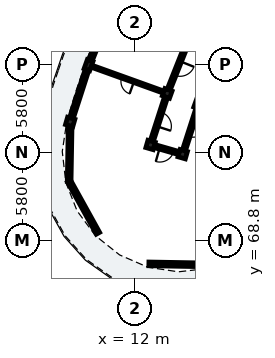
"""IFC4 building model, lengths in metres.
Left out: names, types, materials, properties, quantities, classifications, styles, units other than length and angle.
Written with IfcOpenShell. Run it as: python <this file> out.ifc"""

import sys

from ifc_helpers import new_model, si_unit, direction, frame, frame_2d, origin, origin_2d, place, context, subcontext, project, spatial, rectangle, extrude, element, fill, save


model = new_model("IFC4")
c1 = context("Model", 3, precision=1e-05, world=origin(), true_north=direction((0.0, 1.0)))
c2 = subcontext(c1, "Body", "Model", "MODEL_VIEW")
j1 = project(units=[si_unit("LENGTHUNIT", "METRE"), si_unit("PLANEANGLEUNIT", "RADIAN")], contexts=[c1])
p1 = place(None, origin())
s1 = spatial("IfcSite", under=j1, at=p1, CompositionType="ELEMENT")
p2 = place(p1, origin())
s2 = spatial("IfcBuilding", under=s1, at=p2, CompositionType="ELEMENT")
p3 = place(p2, frame((0.0, 0.0, 29.0)))
s3 = spatial("IfcBuildingStorey", under=s2, at=p3, CompositionType="ELEMENT", Elevation=29.0)
for number, where, z_axis, x_axis in (
    (1, (16.208, 77.745, 0.0), (0.0, 0.0, 1.0), (-0.941, 0.338, 0.0)),
    (2, (14.138, 78.489, 0.0), (0.0, 0.0, 1.0), (-0.941, 0.338, 0.0)),
):
    element("IfcColumn", number, at=place(p3, frame(where, z_axis=z_axis, x_axis=x_axis)), inside=s3, PredefinedType="COLUMN", context=c2, shape_type="SweptSolid", body=[
        extrude(rectangle(XDim=0.5, YDim=0.5, at=origin_2d()), origin(), (0.0, 0.0, 1.0), 3.115),
    ])
p4 = place(p3, frame((8.963, 80.35, 0.0), z_axis=(0.0, 0.0, 1.0), x_axis=(-0.941012100316, 0.338372911236, 0.0)))
e3 = element("IfcColumn", 3, at=p4, inside=s3, PredefinedType="PILASTER", context=c2, shape_type="SweptSolid", body=[
    extrude(rectangle(XDim=0.39, YDim=0.63, at=origin_2d()), origin(), (0.0, 0.0, 1.0), 3.115),
])
for number, where, z_axis, x_axis in (
    (4, (15.159, 74.492, 0.0), (0.0, 0.0, 1.0), (-0.961, 0.276, 0.0)),
    (5, (13.044, 75.098, 0.0), (0.0, 0.0, 1.0), (-0.961, 0.276, 0.0)),
    (6, (7.757, 76.614, 0.0), (0.0, 0.0, 1.0), (-0.961, 0.276, 0.0)),
):
    element("IfcColumn", number, at=place(p3, frame(where, z_axis=z_axis, x_axis=x_axis)), inside=s3, PredefinedType="COLUMN", context=c2, shape_type="SweptSolid", body=[
        extrude(rectangle(XDim=0.5, YDim=0.5, at=origin_2d()), origin(), (0.0, 0.0, 1.0), 3.115),
    ])
p5 = place(p3, frame((10.331, 83.794, 0.0), z_axis=(0.0, 0.0, 1.0), x_axis=(-0.369178347818, -0.929358567778, 0.0)))
e7 = element("IfcWall", 7, at=p5, inside=s3, PredefinedType="SOLIDWALL", context=c2, shape_type="SweptSolid", body=[
    extrude(rectangle(XDim=3.541, YDim=0.245, at=frame_2d((1.77, 0.0))), origin(), (0.0, 0.0, 1.0), 2.355),
])
p6 = place(p5, frame((1.19, 0.0, 0.55)))
e8 = element("IfcOpeningElement", 8, at=p6, cuts=e7, PredefinedType="OPENING", context=c2, shape_type="SweptSolid", body=[
    extrude(rectangle(XDim=1.16, YDim=1.485, at=frame_2d((0.58, 0.743))), frame((0.0, 0.133, 0.0), z_axis=(0.0, -1.0, 0.0), x_axis=(1.0, 0.0, 0.0)), (0.0, 0.0, 1.0), 0.265),
])
p7 = place(p3, frame((8.912, 80.193, 0.0), z_axis=(0.0, 0.0, 1.0), x_axis=(-0.307174013684, -0.951653364055, 0.0)))
e9 = element("IfcWall", 9, at=p7, inside=s3, PredefinedType="SOLIDWALL", context=c2, shape_type="SweptSolid", body=[
    extrude(rectangle(XDim=3.541, YDim=0.245, at=frame_2d((1.771, 0.0))), origin(), (0.0, 0.0, 1.0), 2.355),
])
p8 = place(p7, frame((1.13, 0.0, 0.55)))
e10 = element("IfcOpeningElement", 10, at=p8, cuts=e9, PredefinedType="OPENING", context=c2, shape_type="SweptSolid", body=[
    extrude(rectangle(XDim=1.28, YDim=1.56, at=frame_2d((0.64, 0.78))), frame((0.0, 0.133, 0.0), z_axis=(0.0, -1.0, 0.0), x_axis=(1.0, 0.0, 0.0)), (0.0, 0.0, 1.0), 0.265),
])
p9 = place(p3, frame((16.841, 67.208, 0.0), z_axis=(0.0, 0.0, 1.0), x_axis=(-0.999848096392, 0.017429404492, 0.0)))
e11 = element("IfcWall", 11, at=p9, inside=s3, PredefinedType="SOLIDWALL", context=c2, shape_type="SweptSolid", body=[
    extrude(rectangle(XDim=3.908, YDim=0.245, at=frame_2d((1.954, 0.0))), origin(), (0.0, 0.0, 1.0), 2.355),
])
p10 = place(p3, frame((9.583, 69.289, 0.0), z_axis=(0.0, 0.0, 1.0), x_axis=(-0.484841794757, 0.874601871743, 0.0)))
e12 = element("IfcWall", 12, at=p10, inside=s3, PredefinedType="SOLIDWALL", context=c2, shape_type="SweptSolid", body=[
    extrude(rectangle(XDim=3.908, YDim=0.245, at=frame_2d((1.954, 0.0))), origin(), (0.0, 0.0, 1.0), 2.355),
])
p11 = place(p10, frame((0.979, 0.0, 0.4)))
e13 = element("IfcOpeningElement", 13, at=p11, cuts=e12, PredefinedType="OPENING", context=c2, shape_type="SweptSolid", body=[
    extrude(rectangle(XDim=1.95, YDim=1.78, at=frame_2d((0.975, 0.89))), frame((0.0, 0.133, 0.0), z_axis=(0.0, -1.0, 0.0), x_axis=(1.0, 0.0, 0.0)), (0.0, 0.0, 1.0), 0.265),
])
p12 = place(p3, frame((7.689, 72.707, 0.0), z_axis=(0.0, 0.0, 1.0), x_axis=(0.017428315893, 0.999848115368, 0.0)))
e14 = element("IfcWall", 14, at=p12, inside=s3, PredefinedType="SOLIDWALL", context=c2, shape_type="SweptSolid", body=[
    extrude(rectangle(XDim=3.908, YDim=0.245, at=frame_2d((1.954, 0.0))), origin(), (0.0, 0.0, 1.0), 2.355),
])
p13 = place(p3, frame((15.325, 81.475, 0.0), z_axis=(0.0, 0.0, 1.0), x_axis=(-0.369213832442, -0.929344471083, 0.0)))
e15 = element("IfcWall", 15, at=p13, inside=s3, PredefinedType="PARTITIONING", context=c2, shape_type="SweptSolid", body=[
    extrude(rectangle(XDim=2.863, YDim=0.205, at=frame_2d((1.432, 0.0))), origin(), (0.0, 0.0, 1.0), 2.37),
])
p14 = place(p13, frame((0.937, 0.0, 0.0)))
e16 = element("IfcOpeningElement", 16, at=p14, cuts=e15, PredefinedType="OPENING", context=c2, shape_type="SweptSolid", body=[
    extrude(rectangle(XDim=0.99, YDim=2.16, at=frame_2d((0.495, 1.08))), frame((0.0, 0.113, 0.0), z_axis=(0.0, -1.0, 0.0), x_axis=(1.0, 0.0, 0.0)), (0.0, 0.0, 1.0), 0.225),
])
p15 = place(p3, frame((13.762, 78.625, 0.0), z_axis=(0.0, 0.0, 1.0), x_axis=(-0.941015806044, 0.338362605463, 0.0)))
e17 = element("IfcWall", 17, at=p15, inside=s3, PredefinedType="PLUMBINGWALL", context=c2, shape_type="SweptSolid", body=[
    extrude(rectangle(XDim=4.7, YDim=0.14, at=frame_2d((2.35, 0.0))), origin(), (0.0, 0.0, 1.0), 2.37),
])
p16 = place(p15, frame((1.92, 0.0, 0.0)))
e18 = element("IfcOpeningElement", 18, at=p16, cuts=e17, PredefinedType="OPENING", context=c2, shape_type="SweptSolid", body=[
    extrude(rectangle(XDim=0.86, YDim=2.06, at=frame_2d((0.43, 1.03))), frame((0.0, 0.08, 0.0), z_axis=(0.0, -1.0, 0.0), x_axis=(1.0, 0.0, 0.0)), (0.0, 0.0, 1.0), 0.16),
])
p17 = place(p3, frame((14.031, 78.156, 0.0), z_axis=(0.0, 0.0, 1.0), x_axis=(-0.307132325305, -0.951666819193, 0.0)))
e19 = element("IfcWall", 19, at=p17, inside=s3, PredefinedType="PARTITIONING", context=c2, shape_type="SweptSolid", body=[
    extrude(rectangle(XDim=2.863, YDim=0.205, at=frame_2d((1.432, 0.0))), origin(), (0.0, 0.0, 1.0), 2.37),
])
p18 = place(p17, frame((0.947, 0.0, 0.0)))
e20 = element("IfcOpeningElement", 20, at=p18, cuts=e19, PredefinedType="OPENING", context=c2, shape_type="SweptSolid", body=[
    extrude(rectangle(XDim=0.97, YDim=2.15, at=frame_2d((0.485, 1.075))), frame((0.0, 0.113, 0.0), z_axis=(0.0, -1.0, 0.0), x_axis=(1.0, 0.0, 0.0)), (0.0, 0.0, 1.0), 0.225),
])
p19 = place(p3, frame((16.101, 77.412, 0.0), z_axis=(0.0, 0.0, 1.0), x_axis=(-0.307186478934, -0.95164934044, 0.0)))
e21 = element("IfcWall", 21, at=p19, inside=s3, PredefinedType="PARTITIONING", context=c2, shape_type="SweptSolid", body=[
    extrude(rectangle(XDim=2.718, YDim=0.205, at=frame_2d((1.359, 0.0))), origin(), (0.0, 0.0, 1.0), 2.37),
])
p20 = place(p19, frame((0.874, 0.0, 0.0)))
e22 = element("IfcOpeningElement", 22, at=p20, cuts=e21, PredefinedType="OPENING", context=c2, shape_type="SweptSolid", body=[
    extrude(rectangle(XDim=0.97, YDim=2.15, at=frame_2d((0.485, 1.075))), frame((0.0, 0.113, 0.0), z_axis=(0.0, -1.0, 0.0), x_axis=(1.0, 0.0, 0.0)), (0.0, 0.0, 1.0), 0.225),
])
p21 = place(p3, frame((15.111, 74.506, 0.0), z_axis=(0.0, 0.0, 1.0), x_axis=(-0.961264701934, 0.275626872449, 0.0)))
e23 = element("IfcWall", 23, at=p21, inside=s3, PredefinedType="PARTITIONING", context=c2, shape_type="SweptSolid", body=[
    extrude(rectangle(XDim=2.1, YDim=0.205, at=frame_2d((1.05, 0.0))), origin(), (0.0, 0.0, 1.0), 2.37),
])
p22 = place(p21, frame((0.57, 0.0, 0.0)))
e24 = element("IfcOpeningElement", 24, at=p22, cuts=e23, PredefinedType="OPENING", context=c2, shape_type="SweptSolid", body=[
    extrude(rectangle(XDim=0.95, YDim=2.13, at=frame_2d((0.475, 1.065))), frame((0.0, 0.113, 0.0), z_axis=(0.0, -1.0, 0.0), x_axis=(1.0, 0.0, 0.0)), (0.0, 0.0, 1.0), 0.225),
])
p23 = place(p8, origin())
e25 = element("IfcWindow", 25, at=p23, inside=s3, PartitioningType="SINGLE_PANEL", PredefinedType="WINDOW", context=c2, shape_type="SweptSolid", body=[
    extrude(rectangle(XDim=1.28, YDim=1.56, at=frame_2d((0.64, 0.78))), frame((0.0, 0.03, 0.0), z_axis=(0.0, -1.0, 0.0), x_axis=(1.0, 0.0, 0.0)), (0.0, 0.0, 1.0), 0.06),
])
fill(e10, e25)
p24 = place(p11, origin())
e26 = element("IfcWindow", 26, at=p24, inside=s3, PartitioningType="SINGLE_PANEL", PredefinedType="WINDOW", context=c2, shape_type="SweptSolid", body=[
    extrude(rectangle(XDim=1.95, YDim=1.78, at=frame_2d((0.975, 0.89))), frame((0.0, 0.03, 0.0), z_axis=(0.0, -1.0, 0.0), x_axis=(1.0, 0.0, 0.0)), (0.0, 0.0, 1.0), 0.06),
])
fill(e13, e26)
p25 = place(p14, origin())
e27 = element("IfcDoor", 27, at=p25, inside=s3, OperationType="SINGLE_SWING_LEFT", PredefinedType="DOOR", context=c2, shape_type="SweptSolid", body=[
    extrude(rectangle(XDim=0.99, YDim=2.16, at=frame_2d((0.495, 1.08))), frame((0.0, 0.025, 0.0), z_axis=(0.0, -1.0, 0.0), x_axis=(1.0, 0.0, 0.0)), (0.0, 0.0, 1.0), 0.05),
])
fill(e16, e27)
p26 = place(p16, origin())
e28 = element("IfcDoor", 28, at=p26, inside=s3, OperationType="SINGLE_SWING_LEFT", PredefinedType="DOOR", context=c2, shape_type="SweptSolid", body=[
    extrude(rectangle(XDim=0.86, YDim=2.06, at=frame_2d((0.43, 1.03))), frame((0.0, 0.025, 0.0), z_axis=(0.0, -1.0, 0.0), x_axis=(1.0, 0.0, 0.0)), (0.0, 0.0, 1.0), 0.05),
])
fill(e18, e28)
p27 = place(p18, origin())
e29 = element("IfcDoor", 29, at=p27, inside=s3, OperationType="SINGLE_SWING_RIGHT", PredefinedType="DOOR", context=c2, shape_type="SweptSolid", body=[
    extrude(rectangle(XDim=0.97, YDim=2.15, at=frame_2d((0.485, 1.075))), frame((0.0, 0.025, 0.0), z_axis=(0.0, -1.0, 0.0), x_axis=(1.0, 0.0, 0.0)), (0.0, 0.0, 1.0), 0.05),
])
fill(e20, e29)
p28 = place(p20, origin())
e30 = element("IfcDoor", 30, at=p28, inside=s3, OperationType="SINGLE_SWING_LEFT", PredefinedType="DOOR", context=c2, shape_type="SweptSolid", body=[
    extrude(rectangle(XDim=0.97, YDim=2.15, at=frame_2d((0.485, 1.075))), frame((0.0, 0.025, 0.0), z_axis=(0.0, -1.0, 0.0), x_axis=(1.0, 0.0, 0.0)), (0.0, 0.0, 1.0), 0.05),
])
fill(e22, e30)
p29 = place(p22, origin())
e31 = element("IfcDoor", 31, at=p29, inside=s3, OperationType="SINGLE_SWING_RIGHT", PredefinedType="DOOR", context=c2, shape_type="SweptSolid", body=[
    extrude(rectangle(XDim=0.95, YDim=2.13, at=frame_2d((0.475, 1.065))), frame((0.0, 0.025, 0.0), z_axis=(0.0, -1.0, 0.0), x_axis=(1.0, 0.0, 0.0)), (0.0, 0.0, 1.0), 0.05),
])
fill(e24, e31)
save(model, sys.argv[1])
